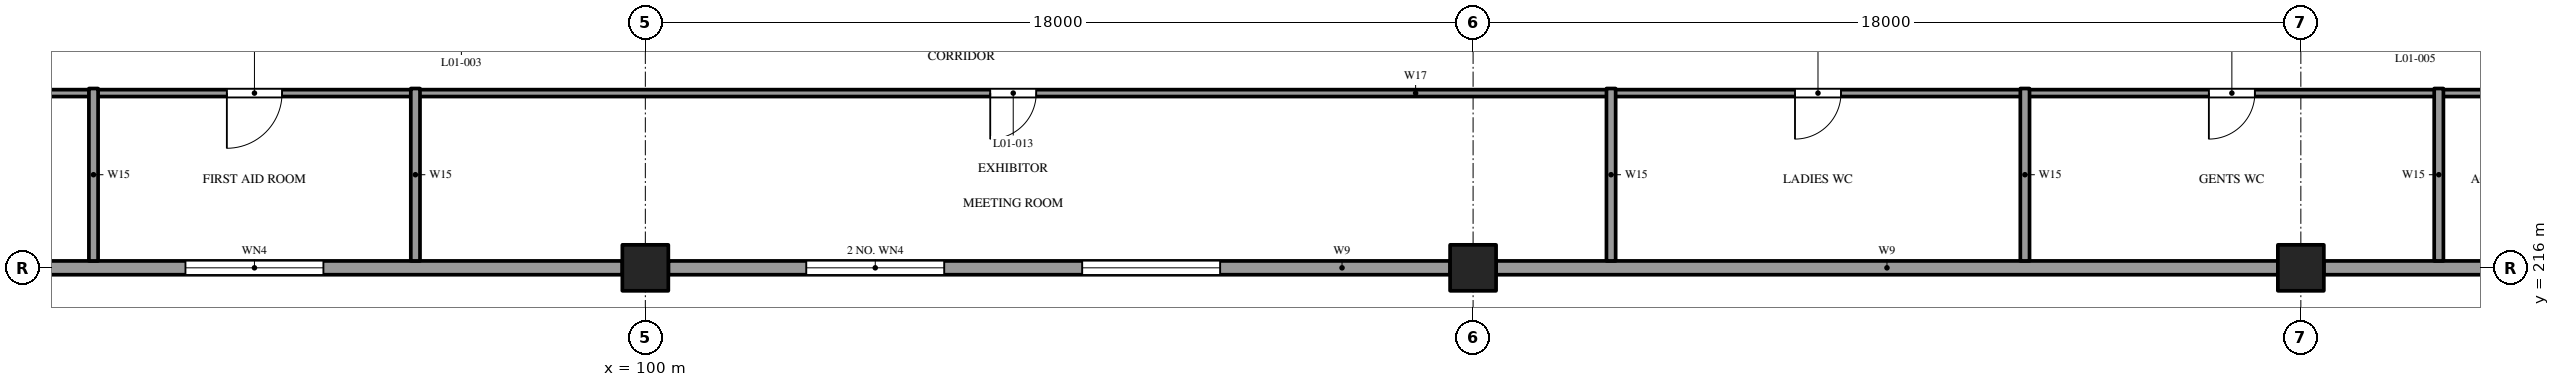
"""IFC4 building model, lengths in metres.
Left out: names, types, materials, properties, quantities, classifications, styles, units other than length and angle.
Written with IfcOpenShell. Run it as: python <this file> out.ifc"""

import sys

from ifc_helpers import new_model, si_unit, direction, frame, frame_2d, origin, origin_2d, place, context, subcontext, project, spatial, polyline, rectangle, outline, extrude, element, fill, save


model = new_model("IFC4")
c1 = context("Model", 3, precision=1e-05, world=origin(), true_north=direction((0.0, 1.0)))
c2 = subcontext(c1, "Body", "Model", "MODEL_VIEW")
j1 = project(units=[si_unit("LENGTHUNIT", "METRE"), si_unit("PLANEANGLEUNIT", "RADIAN")], contexts=[c1])
p1 = place(None, origin())
s1 = spatial("IfcSite", under=j1, at=p1, CompositionType="ELEMENT")
p2 = place(p1, origin())
s2 = spatial("IfcBuilding", under=s1, at=p2, CompositionType="ELEMENT")
p3 = place(p2, frame((0.0, 0.0, 7.2)))
s3 = spatial("IfcBuildingStorey", under=s2, at=p3, CompositionType="ELEMENT", Elevation=7.2)
for number, where, z_axis, x_axis in (
    (1, (100.0, 216.0, 0.0), (0.0, 0.0, 1.0), (1.0, 0.0, 0.0)),
    (2, (118.0, 216.0, 0.0), (0.0, 0.0, 1.0), (1.0, 0.0, 0.0)),
    (3, (136.0, 216.0, 0.0), (0.0, 0.0, 1.0), (1.0, 0.0, 0.0)),
):
    element("IfcColumn", number, at=place(p3, frame(where, z_axis=z_axis, x_axis=x_axis)), inside=s3, PredefinedType="COLUMN", context=c2, shape_type="SweptSolid", body=[
        extrude(rectangle(XDim=1.0, YDim=1.0, at=origin_2d()), origin(), (0.0, 0.0, 1.0), 4.8),
    ])
p4 = place(p3, frame((82.5, 216.0, 0.0), z_axis=(0.0, 0.0, 1.0), x_axis=(1.0, 0.0, 0.0)))
e4 = element("IfcWall", 4, at=p4, inside=s3, PredefinedType="SOLIDWALL", context=c2, shape_type="SweptSolid", body=[
    extrude(rectangle(XDim=17.0, YDim=0.3, at=frame_2d((8.5, 0.0))), origin(), (0.0, 0.0, 1.0), 4.8),
])
p5 = place(p4, frame((7.5, 0.0, 1.0)))
e5 = element("IfcOpeningElement", 5, at=p5, cuts=e4, PredefinedType="OPENING", context=c2, shape_type="SweptSolid", body=[
    extrude(rectangle(XDim=3.0, YDim=1.8, at=frame_2d((1.5, 0.9))), frame((0.0, 0.16, 0.0), z_axis=(0.0, -1.0, 0.0), x_axis=(1.0, 0.0, 0.0)), (0.0, 0.0, 1.0), 0.32),
])
p6 = place(p3, frame((100.5, 216.0, 0.0), z_axis=(0.0, 0.0, 1.0), x_axis=(1.0, 0.0, 0.0)))
e6 = element("IfcWall", 6, at=p6, inside=s3, PredefinedType="SOLIDWALL", context=c2, shape_type="SweptSolid", body=[
    extrude(rectangle(XDim=17.0, YDim=0.3, at=frame_2d((8.5, 0.0))), origin(), (0.0, 0.0, 1.0), 4.8),
])
p7 = place(p6, frame((3.0, 0.0, 1.0)))
e7 = element("IfcOpeningElement", 7, at=p7, cuts=e6, PredefinedType="OPENING", context=c2, shape_type="SweptSolid", body=[
    extrude(rectangle(XDim=3.0, YDim=1.8, at=frame_2d((1.5, 0.9))), frame((0.0, 0.16, 0.0), z_axis=(0.0, -1.0, 0.0), x_axis=(1.0, 0.0, 0.0)), (0.0, 0.0, 1.0), 0.32),
])
p8 = place(p6, frame((9.0, 0.0, 1.0)))
e8 = element("IfcOpeningElement", 8, at=p8, cuts=e6, PredefinedType="OPENING", context=c2, shape_type="SweptSolid", body=[
    extrude(rectangle(XDim=3.0, YDim=1.8, at=frame_2d((1.5, 0.9))), frame((0.0, 0.16, 0.0), z_axis=(0.0, -1.0, 0.0), x_axis=(1.0, 0.0, 0.0)), (0.0, 0.0, 1.0), 0.32),
])
for number, where, z_axis, x_axis in (
    (9, (118.5, 216.0, 0.0), (0.0, 0.0, 1.0), (1.0, 0.0, 0.0)),
    (10, (136.5, 216.0, 0.0), (0.0, 0.0, 1.0), (1.0, 0.0, 0.0)),
):
    element("IfcWall", number, at=place(p3, frame(where, z_axis=z_axis, x_axis=x_axis)), inside=s3, PredefinedType="SOLIDWALL", context=c2, shape_type="SweptSolid", body=[
        extrude(rectangle(XDim=17.0, YDim=0.3, at=frame_2d((8.5, 0.0))), origin(), (0.0, 0.0, 1.0), 4.8),
    ])
p9 = place(p3, frame((28.175, 219.8, 0.0), z_axis=(0.0, 0.0, 1.0), x_axis=(1.0, 0.0, 0.0)))
e11 = element("IfcWall", 11, at=p9, inside=s3, PredefinedType="PARTITIONING", context=c2, shape_type="SweptSolid", body=[
    extrude(rectangle(XDim=123.0, YDim=0.15, at=frame_2d((61.5, 0.0))), origin(), (0.0, 0.0, 1.0), 4.547),
])
p10 = place(p9, frame((6.863, 0.0, 0.0)))
e12 = element("IfcOpeningElement", 12, at=p10, cuts=e11, PredefinedType="OPENING", context=c2, shape_type="SweptSolid", body=[
    extrude(rectangle(XDim=1.0, YDim=2.1, at=frame_2d((0.5, 1.05))), frame((0.0, 0.085, 0.0), z_axis=(0.0, -1.0, 0.0), x_axis=(1.0, 0.0, 0.0)), (0.0, 0.0, 1.0), 0.17),
])
p11 = place(p9, frame((21.825, 0.0, 0.0)))
e13 = element("IfcOpeningElement", 13, at=p11, cuts=e11, PredefinedType="OPENING", context=c2, shape_type="SweptSolid", body=[
    extrude(rectangle(XDim=1.0, YDim=2.1, at=frame_2d((0.5, 1.05))), frame((0.0, 0.085, 0.0), z_axis=(0.0, -1.0, 0.0), x_axis=(1.0, 0.0, 0.0)), (0.0, 0.0, 1.0), 0.17),
])
p12 = place(p9, frame((36.825, 0.0, 0.0)))
e14 = element("IfcOpeningElement", 14, at=p12, cuts=e11, PredefinedType="OPENING", context=c2, shape_type="SweptSolid", body=[
    extrude(rectangle(XDim=1.0, YDim=2.1, at=frame_2d((0.5, 1.05))), frame((0.0, 0.085, 0.0), z_axis=(0.0, -1.0, 0.0), x_axis=(1.0, 0.0, 0.0)), (0.0, 0.0, 1.0), 0.17),
])
p13 = place(p9, frame((51.825, 0.0, 0.0)))
e15 = element("IfcOpeningElement", 15, at=p13, cuts=e11, PredefinedType="OPENING", context=c2, shape_type="SweptSolid", body=[
    extrude(rectangle(XDim=1.0, YDim=2.1, at=frame_2d((0.5, 1.05))), frame((0.0, 0.085, 0.0), z_axis=(0.0, -1.0, 0.0), x_axis=(1.0, 0.0, 0.0)), (0.0, 0.0, 1.0), 0.17),
])
p14 = place(p9, frame((62.725, 0.0, 0.0)))
e16 = element("IfcOpeningElement", 16, at=p14, cuts=e11, PredefinedType="OPENING", context=c2, shape_type="SweptSolid", body=[
    extrude(rectangle(XDim=1.2, YDim=2.1, at=frame_2d((0.6, 1.05))), frame((0.0, 0.085, 0.0), z_axis=(0.0, -1.0, 0.0), x_axis=(1.0, 0.0, 0.0)), (0.0, 0.0, 1.0), 0.17),
])
p15 = place(p9, frame((79.325, 0.0, 0.0)))
e17 = element("IfcOpeningElement", 17, at=p15, cuts=e11, PredefinedType="OPENING", context=c2, shape_type="SweptSolid", body=[
    extrude(rectangle(XDim=1.0, YDim=2.1, at=frame_2d((0.5, 1.05))), frame((0.0, 0.085, 0.0), z_axis=(0.0, -1.0, 0.0), x_axis=(1.0, 0.0, 0.0)), (0.0, 0.0, 1.0), 0.17),
])
p16 = place(p9, frame((96.825, 0.0, 0.0)))
e18 = element("IfcOpeningElement", 18, at=p16, cuts=e11, PredefinedType="OPENING", context=c2, shape_type="SweptSolid", body=[
    extrude(rectangle(XDim=1.0, YDim=2.1, at=frame_2d((0.5, 1.05))), frame((0.0, 0.085, 0.0), z_axis=(0.0, -1.0, 0.0), x_axis=(1.0, 0.0, 0.0)), (0.0, 0.0, 1.0), 0.17),
])
p17 = place(p9, frame((105.825, 0.0, 0.0)))
e19 = element("IfcOpeningElement", 19, at=p17, cuts=e11, PredefinedType="OPENING", context=c2, shape_type="SweptSolid", body=[
    extrude(rectangle(XDim=1.0, YDim=2.1, at=frame_2d((0.5, 1.05))), frame((0.0, 0.085, 0.0), z_axis=(0.0, -1.0, 0.0), x_axis=(1.0, 0.0, 0.0)), (0.0, 0.0, 1.0), 0.17),
])
p18 = place(p9, frame((112.575, 0.0, 0.0)))
e20 = element("IfcOpeningElement", 20, at=p18, cuts=e11, PredefinedType="OPENING", context=c2, shape_type="SweptSolid", body=[
    extrude(rectangle(XDim=1.0, YDim=2.1, at=frame_2d((0.5, 1.05))), frame((0.0, 0.085, 0.0), z_axis=(0.0, -1.0, 0.0), x_axis=(1.0, 0.0, 0.0)), (0.0, 0.0, 1.0), 0.17),
])
p19 = place(p9, frame((119.725, 0.0, 0.0)))
e21 = element("IfcOpeningElement", 21, at=p19, cuts=e11, PredefinedType="OPENING", context=c2, shape_type="SweptSolid", body=[
    extrude(rectangle(XDim=1.2, YDim=2.1, at=frame_2d((0.6, 1.05))), frame((0.0, 0.085, 0.0), z_axis=(0.0, -1.0, 0.0), x_axis=(1.0, 0.0, 0.0)), (0.0, 0.0, 1.0), 0.17),
])
for number, where, z_axis, x_axis in (
    (22, (88.0, 216.15, 0.0), (0.0, 0.0, 1.0), (0.0, 1.0, 0.0)),
    (23, (95.0, 216.15, 0.0), (0.0, 0.0, 1.0), (0.0, 1.0, 0.0)),
    (24, (121.0, 216.15, 0.0), (0.0, 0.0, 1.0), (0.0, 1.0, 0.0)),
    (25, (130.0, 216.15, 0.0), (0.0, 0.0, 1.0), (0.0, 1.0, 0.0)),
    (26, (139.0, 216.15, 0.0), (0.0, 0.0, 1.0), (0.0, 1.0, 0.0)),
):
    element("IfcWall", number, at=place(p3, frame(where, z_axis=z_axis, x_axis=x_axis)), inside=s3, PredefinedType="PARTITIONING", context=c2, shape_type="SweptSolid", body=[
        extrude(outline(polyline([(0.0, 0.0), (3.75, 0.0), (3.75, 4.541), (0.0, 4.737), (0.0, 0.0)])), frame((0.0, 0.1, 0.0), z_axis=(0.0, -1.0, 0.0), x_axis=(1.0, 0.0, 0.0)), (0.0, 0.0, 1.0), 0.2),
    ])
p20 = place(p5, origin())
e27 = element("IfcWindow", 27, at=p20, inside=s3, PartitioningType="SINGLE_PANEL", PredefinedType="WINDOW", context=c2, shape_type="SweptSolid", body=[
    extrude(rectangle(XDim=3.0, YDim=1.8, at=frame_2d((1.5, 0.9))), frame((0.0, 0.03, 0.0), z_axis=(0.0, -1.0, 0.0), x_axis=(1.0, 0.0, 0.0)), (0.0, 0.0, 1.0), 0.06),
])
fill(e5, e27)
p21 = place(p7, origin())
e28 = element("IfcWindow", 28, at=p21, inside=s3, PartitioningType="SINGLE_PANEL", PredefinedType="WINDOW", context=c2, shape_type="SweptSolid", body=[
    extrude(rectangle(XDim=3.0, YDim=1.8, at=frame_2d((1.5, 0.9))), frame((0.0, 0.03, 0.0), z_axis=(0.0, -1.0, 0.0), x_axis=(1.0, 0.0, 0.0)), (0.0, 0.0, 1.0), 0.06),
])
fill(e7, e28)
p22 = place(p8, origin())
e29 = element("IfcWindow", 29, at=p22, inside=s3, PartitioningType="SINGLE_PANEL", PredefinedType="WINDOW", context=c2, shape_type="SweptSolid", body=[
    extrude(rectangle(XDim=3.0, YDim=1.8, at=frame_2d((1.5, 0.9))), frame((0.0, 0.03, 0.0), z_axis=(0.0, -1.0, 0.0), x_axis=(1.0, 0.0, 0.0)), (0.0, 0.0, 1.0), 0.06),
])
fill(e8, e29)
p23 = place(p14, frame((1.2, 0.0, 0.0), z_axis=(0.0, 0.0, 1.0), x_axis=(-1.0, 0.0, 0.0)))
e30 = element("IfcDoor", 30, at=p23, inside=s3, OperationType="SINGLE_SWING_LEFT", PredefinedType="DOOR", context=c2, shape_type="SweptSolid", body=[
    extrude(rectangle(XDim=1.2, YDim=2.1, at=frame_2d((0.6, 1.05))), frame((0.0, 0.025, 0.0), z_axis=(0.0, -1.0, 0.0), x_axis=(1.0, 0.0, 0.0)), (0.0, 0.0, 1.0), 0.05),
])
fill(e16, e30)
p24 = place(p15, frame((1.0, 0.0, 0.0), z_axis=(0.0, 0.0, 1.0), x_axis=(-1.0, 0.0, 0.0)))
e31 = element("IfcDoor", 31, at=p24, inside=s3, OperationType="SINGLE_SWING_RIGHT", PredefinedType="DOOR", context=c2, shape_type="SweptSolid", body=[
    extrude(rectangle(XDim=1.0, YDim=2.1, at=frame_2d((0.5, 1.05))), frame((0.0, 0.025, 0.0), z_axis=(0.0, -1.0, 0.0), x_axis=(1.0, 0.0, 0.0)), (0.0, 0.0, 1.0), 0.05),
])
fill(e17, e31)
p25 = place(p16, frame((1.0, 0.0, 0.0), z_axis=(0.0, 0.0, 1.0), x_axis=(-1.0, 0.0, 0.0)))
e32 = element("IfcDoor", 32, at=p25, inside=s3, OperationType="SINGLE_SWING_LEFT", PredefinedType="DOOR", context=c2, shape_type="SweptSolid", body=[
    extrude(rectangle(XDim=1.0, YDim=2.1, at=frame_2d((0.5, 1.05))), frame((0.0, 0.025, 0.0), z_axis=(0.0, -1.0, 0.0), x_axis=(1.0, 0.0, 0.0)), (0.0, 0.0, 1.0), 0.05),
])
fill(e18, e32)
p26 = place(p17, frame((1.0, 0.0, 0.0), z_axis=(0.0, 0.0, 1.0), x_axis=(-1.0, 0.0, 0.0)))
e33 = element("IfcDoor", 33, at=p26, inside=s3, OperationType="SINGLE_SWING_RIGHT", PredefinedType="DOOR", context=c2, shape_type="SweptSolid", body=[
    extrude(rectangle(XDim=1.0, YDim=2.1, at=frame_2d((0.5, 1.05))), frame((0.0, 0.025, 0.0), z_axis=(0.0, -1.0, 0.0), x_axis=(1.0, 0.0, 0.0)), (0.0, 0.0, 1.0), 0.05),
])
fill(e19, e33)
save(model, sys.argv[1])
